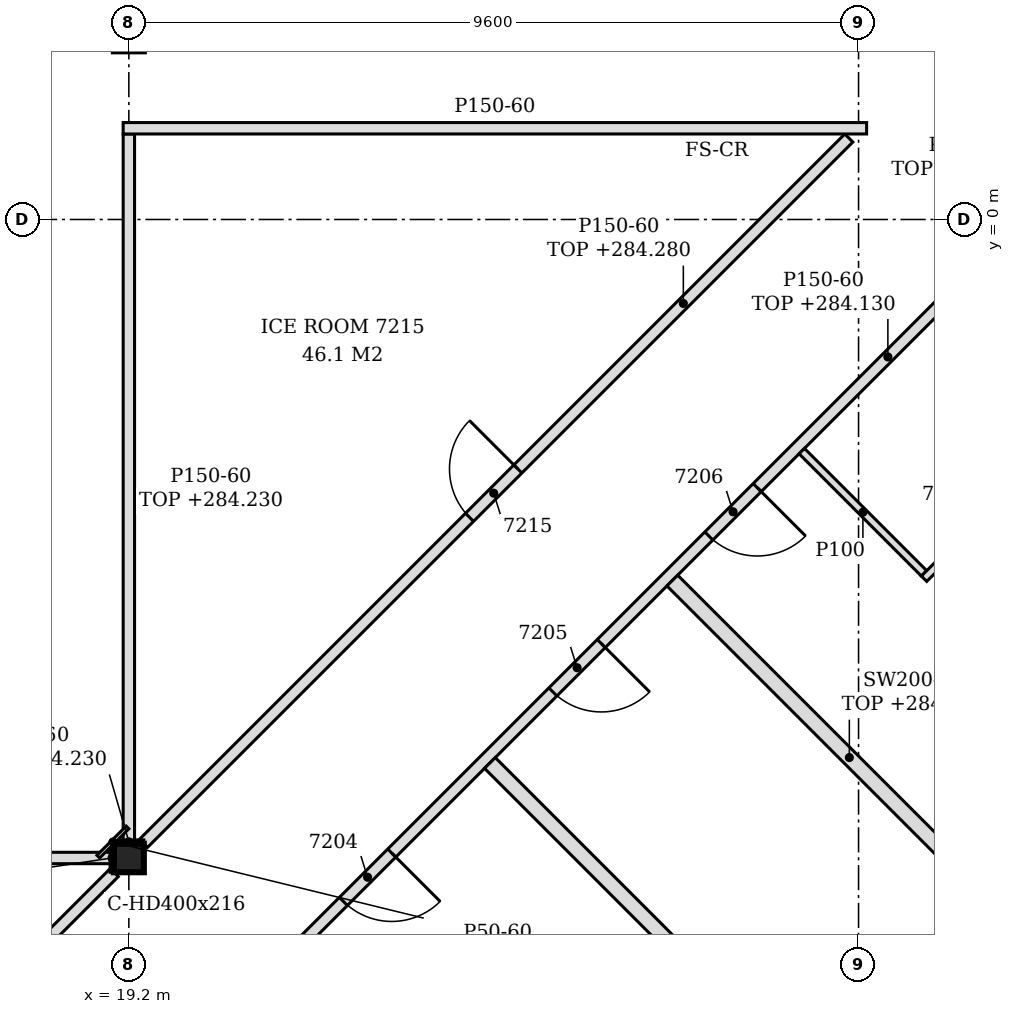
"""IFC4 building model, lengths in metres.
Left out: names, types, materials, properties, quantities, classifications, styles, units other than length and angle.
Written with IfcOpenShell. Run it as: python <this file> out.ifc"""

import sys

from ifc_helpers import new_model, si_unit, direction, frame, frame_2d, origin, origin_2d, place, context, subcontext, project, spatial, polyline, rectangle, i_section, outline, extrude, element, fill, save


model = new_model("IFC4")
c1 = context("Model", 3, precision=1e-05, world=origin(), true_north=direction((0.0, 1.0)))
c2 = subcontext(c1, "Body", "Model", "MODEL_VIEW")
j1 = project(units=[si_unit("LENGTHUNIT", "METRE"), si_unit("PLANEANGLEUNIT", "RADIAN")], contexts=[c1])
p1 = place(None, origin())
s1 = spatial("IfcSite", under=j1, at=p1, CompositionType="ELEMENT")
p2 = place(p1, origin())
s2 = spatial("IfcBuilding", under=s1, at=p2, CompositionType="ELEMENT")
p3 = place(p2, frame((0.0, 0.0, 281.4)))
s3 = spatial("IfcBuildingStorey", under=s2, at=p3, CompositionType="ELEMENT", Elevation=281.4)
p4 = place(p3, frame((19.2, -8.4, -0.15), z_axis=(0.0, 0.0, 1.0), x_axis=(1.0, 0.0, 0.0)))
e1 = element("IfcColumn", 1, at=p4, inside=s3, PredefinedType="COLUMN", context=c2, shape_type="SweptSolid", body=[
    extrude(i_section(OverallWidth=0.394, OverallDepth=0.375, WebThickness=0.017, FlangeThickness=0.028, FilletRadius=0.015, at=origin_2d()), origin(), (0.0, 0.0, 1.0), 3.6),
])
p5 = place(p3, frame((14.322, -16.672, 0.0), z_axis=(0.0, 0.0, 1.0), x_axis=(0.707106781187, 0.707106781187, 0.0)))
e2 = element("IfcWall", 2, at=p5, inside=s3, PredefinedType="PARTITIONING", context=c2, shape_type="SweptSolid", body=[
    extrude(rectangle(XDim=23.452, YDim=0.15, at=frame_2d((11.726, 0.0))), origin(), (0.0, 0.0, 1.0), 2.73),
])
p6 = place(p5, frame((0.775, 0.0, 0.0)))
e3 = element("IfcOpeningElement", 3, at=p6, cuts=e2, PredefinedType="OPENING", context=c2, shape_type="SweptSolid", body=[
    extrude(rectangle(XDim=0.9, YDim=2.1, at=frame_2d((0.45, 1.05))), frame((0.0, 0.085, 0.0), z_axis=(0.0, -1.0, 0.0), x_axis=(1.0, 0.0, 0.0)), (0.0, 0.0, 1.0), 0.17),
])
p7 = place(p5, frame((6.489, 0.0, 0.0)))
e4 = element("IfcOpeningElement", 4, at=p7, cuts=e2, PredefinedType="OPENING", context=c2, shape_type="SweptSolid", body=[
    extrude(rectangle(XDim=0.9, YDim=2.1, at=frame_2d((0.45, 1.05))), frame((0.0, 0.085, 0.0), z_axis=(0.0, -1.0, 0.0), x_axis=(1.0, 0.0, 0.0)), (0.0, 0.0, 1.0), 0.17),
])
p8 = place(p5, frame((10.89, 0.0, 0.0)))
e5 = element("IfcOpeningElement", 5, at=p8, cuts=e2, PredefinedType="OPENING", context=c2, shape_type="SweptSolid", body=[
    extrude(rectangle(XDim=0.9, YDim=2.1, at=frame_2d((0.45, 1.05))), frame((0.0, 0.085, 0.0), z_axis=(0.0, -1.0, 0.0), x_axis=(1.0, 0.0, 0.0)), (0.0, 0.0, 1.0), 0.17),
])
p9 = place(p5, frame((14.788, 0.0, 0.0)))
e6 = element("IfcOpeningElement", 6, at=p9, cuts=e2, PredefinedType="OPENING", context=c2, shape_type="SweptSolid", body=[
    extrude(rectangle(XDim=0.9, YDim=2.1, at=frame_2d((0.45, 1.05))), frame((0.0, 0.085, 0.0), z_axis=(0.0, -1.0, 0.0), x_axis=(1.0, 0.0, 0.0)), (0.0, 0.0, 1.0), 0.17),
])
p10 = place(p5, frame((17.689, 0.0, 0.0)))
e7 = element("IfcOpeningElement", 7, at=p10, cuts=e2, PredefinedType="OPENING", context=c2, shape_type="SweptSolid", body=[
    extrude(rectangle(XDim=0.9, YDim=2.1, at=frame_2d((0.45, 1.05))), frame((0.0, 0.085, 0.0), z_axis=(0.0, -1.0, 0.0), x_axis=(1.0, 0.0, 0.0)), (0.0, 0.0, 1.0), 0.17),
])
p11 = place(p3, frame((13.353, -14.247, 0.0), z_axis=(0.0, 0.0, 1.0), x_axis=(0.707106781187, 0.707106781187, 0.0)))
e8 = element("IfcWall", 8, at=p11, inside=s3, PredefinedType="PARTITIONING", context=c2, shape_type="SweptSolid", body=[
    extrude(rectangle(XDim=7.997, YDim=0.15, at=frame_2d((3.999, 0.0))), origin(), (0.0, 0.0, 1.0), 3.45),
])
p12 = place(p3, frame((30.981, -14.181, 0.0), z_axis=(0.0, 0.0, 1.0), x_axis=(-0.707094504281, 0.707119057879, 0.0)))
e9 = element("IfcWall", 9, at=p12, inside=s3, PredefinedType="PARTITIONING", context=c2, shape_type="SweptSolid", body=[
    extrude(rectangle(XDim=9.943, YDim=0.2, at=frame_2d((4.972, 0.0))), origin(), (0.0, 0.0, 1.0), 2.63),
])
p13 = place(p3, frame((31.008, -9.408, 0.0), z_axis=(0.0, 0.0, 1.0), x_axis=(-0.707106781187, 0.707106781187, 0.0)))
e10 = element("IfcWall", 10, at=p13, inside=s3, PredefinedType="PARTITIONING", context=c2, shape_type="SweptSolid", body=[
    extrude(rectangle(XDim=6.587, YDim=0.2, at=frame_2d((3.293, 0.0))), origin(), (0.0, 0.0, 1.0), 2.88),
])
p14 = place(p3, frame((7.397, -8.4, 0.0), z_axis=(0.0, 0.0, 1.0), x_axis=(1.0, 0.0, 0.0)))
e11 = element("IfcWall", 11, at=p14, inside=s3, PredefinedType="PARTITIONING", context=c2, shape_type="SweptSolid", body=[
    extrude(rectangle(XDim=11.606, YDim=0.15, at=frame_2d((5.803, 0.0))), origin(), (0.0, 0.0, 1.0), 2.83),
])
p15 = place(p14, frame((4.603, 0.0, 0.0)))
e12 = element("IfcOpeningElement", 12, at=p15, cuts=e11, PredefinedType="OPENING", context=c2, shape_type="SweptSolid", body=[
    extrude(rectangle(XDim=0.9, YDim=2.1, at=frame_2d((0.45, 1.05))), frame((0.0, 0.085, 0.0), z_axis=(0.0, -1.0, 0.0), x_axis=(1.0, 0.0, 0.0)), (0.0, 0.0, 1.0), 0.17),
])
p16 = place(p3, frame((19.2, -8.212, 0.0), z_axis=(0.0, 0.0, 1.0), x_axis=(0.0, 1.0, 0.0)))
e13 = element("IfcWall", 13, at=p16, inside=s3, PredefinedType="PARTITIONING", context=c2, shape_type="SweptSolid", body=[
    extrude(rectangle(XDim=9.337, YDim=0.15, at=frame_2d((4.669, 0.0))), origin(), (0.0, 0.0, 1.0), 2.83),
])
p17 = place(p3, frame((19.392, -8.208, 0.0), z_axis=(0.0, 0.0, 1.0), x_axis=(0.707106781187, 0.707106781187, 0.0)))
e14 = element("IfcWall", 14, at=p17, inside=s3, PredefinedType="PARTITIONING", context=c2, shape_type="SweptSolid", body=[
    extrude(rectangle(XDim=13.124, YDim=0.15, at=frame_2d((6.562, 0.0))), origin(), (0.0, 0.0, 1.0), 2.88),
])
p18 = place(p17, frame((6.066, 0.0, 0.0)))
e15 = element("IfcOpeningElement", 15, at=p18, cuts=e14, PredefinedType="OPENING", context=c2, shape_type="SweptSolid", body=[
    extrude(rectangle(XDim=0.9, YDim=2.1, at=frame_2d((0.45, 1.05))), frame((0.0, 0.085, 0.0), z_axis=(0.0, -1.0, 0.0), x_axis=(1.0, 0.0, 0.0)), (0.0, 0.0, 1.0), 0.17),
])
p19 = place(p3, frame((29.662, -4.656, 0.0), z_axis=(0.0, 0.0, 1.0), x_axis=(-0.707160441348, 0.707053116953, 0.0)))
e16 = element("IfcWall", 16, at=p19, inside=s3, PredefinedType="PARTITIONING", context=c2, shape_type="SweptSolid", body=[
    extrude(rectangle(XDim=2.275, YDim=0.1, at=frame_2d((1.137, 0.0))), origin(), (0.0, 0.0, 1.0), 3.45),
])
p20 = place(p3, frame((29.662, -4.726, 0.0), z_axis=(0.0, 0.0, 1.0), x_axis=(0.707147476809, 0.707066083222, 0.0)))
e17 = element("IfcWall", 17, at=p20, inside=s3, PredefinedType="PARTITIONING", context=c2, shape_type="SweptSolid", body=[
    extrude(rectangle(XDim=3.0, YDim=0.1, at=frame_2d((1.5, 0.0))), origin(), (0.0, 0.0, 1.0), 2.88),
])
p21 = place(p20, frame((1.1, 0.0, 0.0)))
e18 = element("IfcOpeningElement", 18, at=p21, cuts=e17, PredefinedType="OPENING", context=c2, shape_type="SweptSolid", body=[
    extrude(rectangle(XDim=0.9, YDim=2.1, at=frame_2d((0.45, 1.05))), frame((0.0, 0.06, 0.0), z_axis=(0.0, -1.0, 0.0), x_axis=(1.0, 0.0, 0.0)), (0.0, 0.0, 1.0), 0.12),
])
p22 = place(p3, frame((19.125, 1.2, 0.0), z_axis=(0.0, 0.0, 1.0), x_axis=(1.0, 0.0, 0.0)))
e19 = element("IfcWall", 19, at=p22, inside=s3, PredefinedType="PARTITIONING", context=c2, shape_type="SweptSolid", body=[
    extrude(outline(polyline([(0.0, 0.0), (9.781, 0.0), (9.781, 3.45), (0.225, 3.45), (0.223, 2.83), (0.0, 2.83), (0.0, 0.0)])), frame((0.0, 0.075, 0.0), z_axis=(0.0, -1.0, 0.0), x_axis=(1.0, 0.0, 0.0)), (0.0, 0.0, 1.0), 0.15),
])
p23 = place(p3, frame((18.798, -8.382, 0.0), z_axis=(0.0, 0.0, 1.0), x_axis=(0.707106781187, 0.707106781187, 0.0)))
e20 = element("IfcWall", 20, at=p23, inside=s3, PredefinedType="PARTITIONING", context=c2, shape_type="SweptSolid", body=[
    extrude(rectangle(XDim=0.544, YDim=0.05, at=frame_2d((0.272, 0.0))), origin(), (0.0, 0.0, 1.0), 2.83),
])
p24 = place(p3, frame((19.003, -8.188, 0.0), z_axis=(0.0, 0.0, 1.0), x_axis=(1.0, 0.0, 0.0)))
e21 = element("IfcWall", 21, at=p24, inside=s3, PredefinedType="PARTITIONING", context=c2, shape_type="SweptSolid", body=[
    extrude(rectangle(XDim=0.394, YDim=0.05, at=frame_2d((0.197, 0.0))), origin(), (0.0, 0.0, 1.0), 2.83),
])
p25 = place(p3, frame((18.978, -8.587, 0.0), z_axis=(0.0, 0.0, 1.0), x_axis=(0.0, 1.0, 0.0)))
e22 = element("IfcWall", 22, at=p25, inside=s3, PredefinedType="PARTITIONING", context=c2, shape_type="SweptSolid", body=[
    extrude(rectangle(XDim=0.375, YDim=0.05, at=frame_2d((0.188, 0.0))), origin(), (0.0, 0.0, 1.0), 2.83),
])
p26 = place(p8, frame((0.9, 0.0, 0.0), z_axis=(0.0, 0.0, 1.0), x_axis=(-1.0, 0.0, 0.0)))
e23 = element("IfcDoor", 23, at=p26, inside=s3, OperationType="SINGLE_SWING_LEFT", PredefinedType="DOOR", context=c2, shape_type="SweptSolid", body=[
    extrude(rectangle(XDim=0.9, YDim=2.1, at=frame_2d((0.45, 1.05))), frame((0.0, 0.025, 0.0), z_axis=(0.0, -1.0, 0.0), x_axis=(1.0, 0.0, 0.0)), (0.0, 0.0, 1.0), 0.05),
])
fill(e5, e23)
p27 = place(p9, frame((0.9, 0.0, 0.0), z_axis=(0.0, 0.0, 1.0), x_axis=(-1.0, 0.0, 0.0)))
e24 = element("IfcDoor", 24, at=p27, inside=s3, OperationType="SINGLE_SWING_LEFT", PredefinedType="DOOR", context=c2, shape_type="SweptSolid", body=[
    extrude(rectangle(XDim=0.9, YDim=2.1, at=frame_2d((0.45, 1.05))), frame((0.0, 0.025, 0.0), z_axis=(0.0, -1.0, 0.0), x_axis=(1.0, 0.0, 0.0)), (0.0, 0.0, 1.0), 0.05),
])
fill(e6, e24)
p28 = place(p10, frame((0.9, 0.0, 0.0), z_axis=(0.0, 0.0, 1.0), x_axis=(-1.0, 0.0, 0.0)))
e25 = element("IfcDoor", 25, at=p28, inside=s3, OperationType="SINGLE_SWING_LEFT", PredefinedType="DOOR", context=c2, shape_type="SweptSolid", body=[
    extrude(rectangle(XDim=0.9, YDim=2.1, at=frame_2d((0.45, 1.05))), frame((0.0, 0.025, 0.0), z_axis=(0.0, -1.0, 0.0), x_axis=(1.0, 0.0, 0.0)), (0.0, 0.0, 1.0), 0.05),
])
fill(e7, e25)
p29 = place(p18, origin())
e26 = element("IfcDoor", 26, at=p29, inside=s3, OperationType="SINGLE_SWING_RIGHT", PredefinedType="DOOR", context=c2, shape_type="SweptSolid", body=[
    extrude(rectangle(XDim=0.9, YDim=2.1, at=frame_2d((0.45, 1.05))), frame((0.0, 0.025, 0.0), z_axis=(0.0, -1.0, 0.0), x_axis=(1.0, 0.0, 0.0)), (0.0, 0.0, 1.0), 0.05),
])
fill(e15, e26)
save(model, sys.argv[1])
